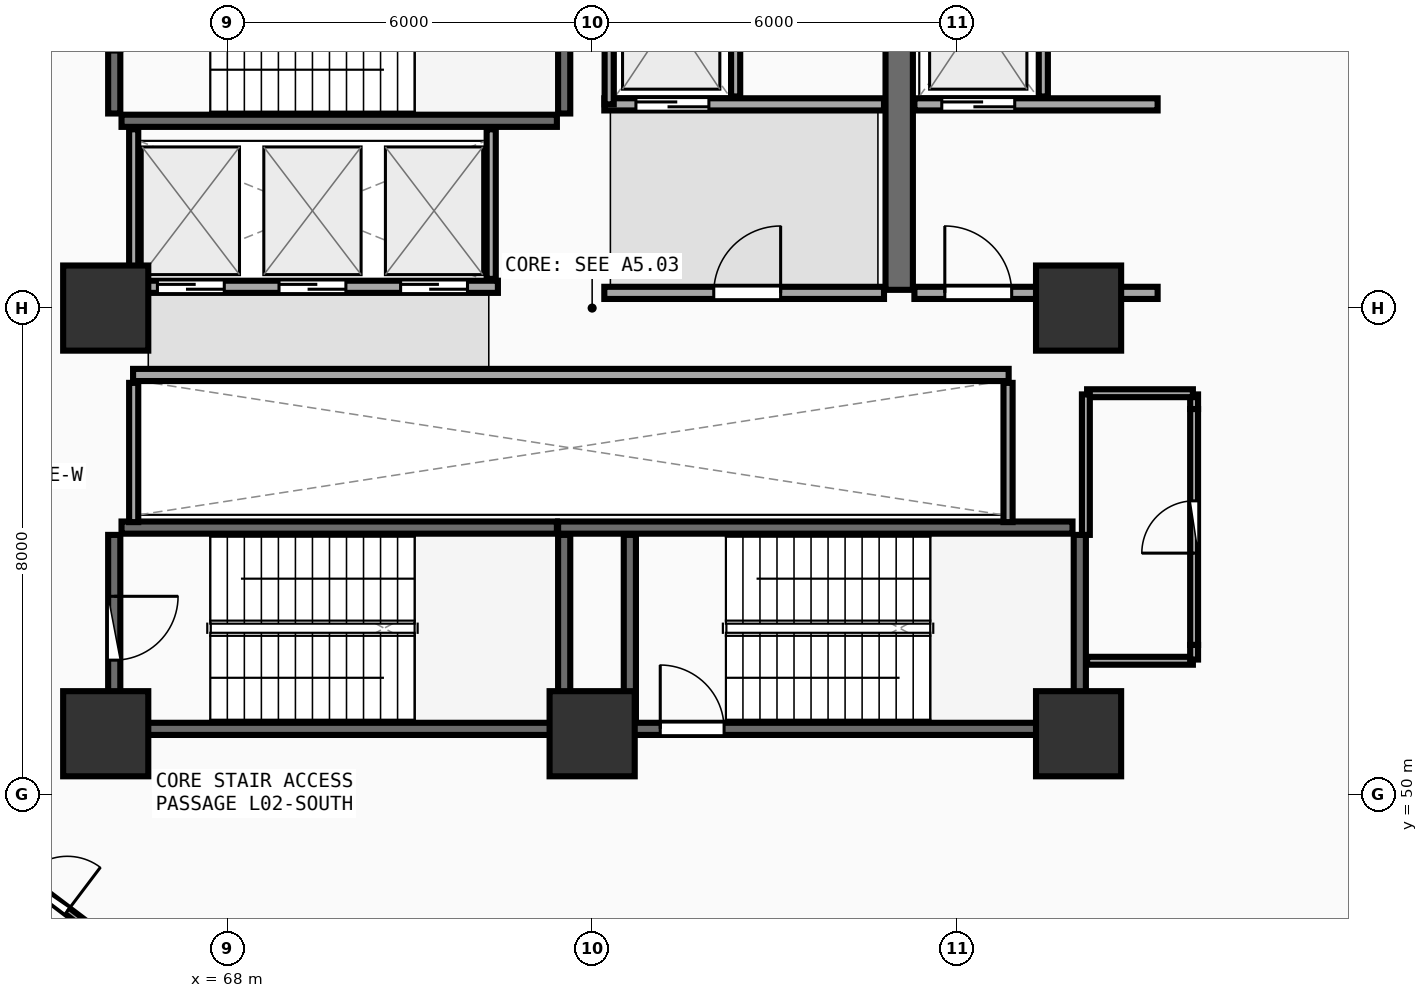
"""IFC4 building model, lengths in metres.
Left out: names, types, materials, properties, quantities, classifications, styles, units other than length and angle.
Written with IfcOpenShell. Run it as: python <this file> out.ifc"""

import sys

from ifc_helpers import new_model, si_unit, direction, frame, frame_2d, origin, origin_2d, place, context, subcontext, project, spatial, rectangle, extrude, element, fill, save


model = new_model("IFC4")
c1 = context("Model", 3, precision=1e-05, world=origin(), true_north=direction((0.0, 1.0)))
c2 = subcontext(c1, "Body", "Model", "MODEL_VIEW")
j1 = project(units=[si_unit("LENGTHUNIT", "METRE"), si_unit("PLANEANGLEUNIT", "RADIAN")], contexts=[c1])
p1 = place(None, origin())
s1 = spatial("IfcSite", under=j1, at=p1, CompositionType="ELEMENT")
p2 = place(p1, origin())
s2 = spatial("IfcBuilding", under=s1, at=p2, CompositionType="ELEMENT")
p3 = place(p2, frame((0.0, 0.0, 9.0)))
s3 = spatial("IfcBuildingStorey", under=s2, at=p3, CompositionType="ELEMENT", Elevation=9.0)
for number, where, z_axis, x_axis in (
    (1, (66.0, 51.0, 0.0), (0.0, 0.0, 1.0), (1.0, 0.0, 0.0)),
    (2, (74.0, 51.0, 0.0), (0.0, 0.0, 1.0), (1.0, 0.0, 0.0)),
    (3, (82.0, 51.0, 0.0), (0.0, 0.0, 1.0), (1.0, 0.0, 0.0)),
    (4, (82.0, 58.0, 0.0), (0.0, 0.0, 1.0), (1.0, 0.0, 0.0)),
    (5, (66.0, 58.0, 0.0), (0.0, 0.0, 1.0), (1.0, 0.0, 0.0)),
):
    element("IfcColumn", number, at=place(p3, frame(where, z_axis=z_axis, x_axis=x_axis)), inside=s3, PredefinedType="PILASTER", context=c2, shape_type="SweptSolid", body=[
        extrude(rectangle(XDim=1.4, YDim=1.4, at=origin_2d()), origin(), (0.0, 0.0, 1.0), 4.5),
    ])
p4 = place(p3, frame((66.26, 61.08, 0.0), z_axis=(0.0, 0.0, 1.0), x_axis=(1.0, 0.0, 0.0)))
e6 = element("IfcWall", 6, at=p4, inside=s3, PredefinedType="SHEAR", context=c2, shape_type="SweptSolid", body=[
    extrude(rectangle(XDim=7.16, YDim=0.2, at=frame_2d((3.58, 0.0))), origin(), (0.0, 0.0, 1.0), 4.1),
])
p5 = place(p3, frame((73.54, 61.2, 0.0), z_axis=(0.0, 0.0, 1.0), x_axis=(0.0, 1.0, 0.0)))
e7 = element("IfcWall", 7, at=p5, inside=s3, PredefinedType="SHEAR", context=c2, shape_type="SweptSolid", body=[
    extrude(rectangle(XDim=3.07, YDim=0.2, at=frame_2d((1.535, 0.0))), origin(), (0.0, 0.0, 1.0), 4.1),
])
p6 = place(p3, frame((66.14, 64.27, 0.0), z_axis=(0.0, 0.0, 1.0), x_axis=(0.0, -1.0, 0.0)))
e8 = element("IfcWall", 8, at=p6, inside=s3, PredefinedType="SHEAR", context=c2, shape_type="SweptSolid", body=[
    extrude(rectangle(XDim=3.07, YDim=0.2, at=frame_2d((1.535, 0.0))), origin(), (0.0, 0.0, 1.0), 4.1),
])
p7 = place(p6, frame((1.01, 0.0, 0.0)))
e9 = element("IfcOpeningElement", 9, at=p7, cuts=e8, PredefinedType="OPENING", context=c2, shape_type="SweptSolid", body=[
    extrude(rectangle(XDim=1.05, YDim=2.1, at=frame_2d((0.525, 1.05))), frame((0.0, 0.11, 0.0), z_axis=(0.0, -1.0, 0.0), x_axis=(1.0, 0.0, 0.0)), (0.0, 0.0, 1.0), 0.22),
])
p8 = place(p3, frame((74.0, 51.08, 0.0), z_axis=(0.0, 0.0, 1.0), x_axis=(1.0, 0.0, 0.0)))
e10 = element("IfcWall", 10, at=p8, inside=s3, PredefinedType="SHEAR", context=c2, shape_type="SweptSolid", body=[
    extrude(rectangle(XDim=7.9, YDim=0.2, at=frame_2d((3.95, 0.0))), origin(), (0.0, 0.0, 1.0), 4.1),
])
p9 = place(p8, frame((1.12, 0.0, 0.0)))
e11 = element("IfcOpeningElement", 11, at=p9, cuts=e10, PredefinedType="OPENING", context=c2, shape_type="SweptSolid", body=[
    extrude(rectangle(XDim=1.05, YDim=2.1, at=frame_2d((0.525, 1.05))), frame((0.0, 0.11, 0.0), z_axis=(0.0, -1.0, 0.0), x_axis=(1.0, 0.0, 0.0)), (0.0, 0.0, 1.0), 0.22),
])
p10 = place(p3, frame((82.02, 51.2, 0.0), z_axis=(0.0, 0.0, 1.0), x_axis=(0.0, 1.0, 0.0)))
e12 = element("IfcWall", 12, at=p10, inside=s3, PredefinedType="SHEAR", context=c2, shape_type="SweptSolid", body=[
    extrude(rectangle(XDim=3.07, YDim=0.2, at=frame_2d((1.535, 0.0))), origin(), (0.0, 0.0, 1.0), 4.1),
])
p11 = place(p3, frame((81.9, 54.39, 0.0), z_axis=(0.0, 0.0, 1.0), x_axis=(-1.0, 0.0, 0.0)))
e13 = element("IfcWall", 13, at=p11, inside=s3, PredefinedType="SHEAR", context=c2, shape_type="SweptSolid", body=[
    extrude(rectangle(XDim=8.46, YDim=0.2, at=frame_2d((4.23, 0.0))), origin(), (0.0, 0.0, 1.0), 4.1),
])
p12 = place(p3, frame((74.62, 54.27, 0.0), z_axis=(0.0, 0.0, 1.0), x_axis=(0.0, -1.0, 0.0)))
e14 = element("IfcWall", 14, at=p12, inside=s3, PredefinedType="SHEAR", context=c2, shape_type="SweptSolid", body=[
    extrude(rectangle(XDim=3.07, YDim=0.2, at=frame_2d((1.535, 0.0))), origin(), (0.0, 0.0, 1.0), 4.1),
])
p13 = place(p3, frame((66.26, 51.08, 0.0), z_axis=(0.0, 0.0, 1.0), x_axis=(1.0, 0.0, 0.0)))
e15 = element("IfcWall", 15, at=p13, inside=s3, PredefinedType="SHEAR", context=c2, shape_type="SweptSolid", body=[
    extrude(rectangle(XDim=7.16, YDim=0.2, at=frame_2d((3.58, 0.0))), origin(), (0.0, 0.0, 1.0), 4.1),
])
p14 = place(p3, frame((73.54, 51.2, 0.0), z_axis=(0.0, 0.0, 1.0), x_axis=(0.0, 1.0, 0.0)))
e16 = element("IfcWall", 16, at=p14, inside=s3, PredefinedType="SHEAR", context=c2, shape_type="SweptSolid", body=[
    extrude(rectangle(XDim=3.07, YDim=0.2, at=frame_2d((1.535, 0.0))), origin(), (0.0, 0.0, 1.0), 4.1),
])
p15 = place(p3, frame((73.42, 54.39, 0.0), z_axis=(0.0, 0.0, 1.0), x_axis=(-1.0, 0.0, 0.0)))
e17 = element("IfcWall", 17, at=p15, inside=s3, PredefinedType="SHEAR", context=c2, shape_type="SweptSolid", body=[
    extrude(rectangle(XDim=7.16, YDim=0.2, at=frame_2d((3.58, 0.0))), origin(), (0.0, 0.0, 1.0), 4.1),
])
p16 = place(p3, frame((66.14, 54.27, 0.0), z_axis=(0.0, 0.0, 1.0), x_axis=(0.0, -1.0, 0.0)))
e18 = element("IfcWall", 18, at=p16, inside=s3, PredefinedType="SHEAR", context=c2, shape_type="SweptSolid", body=[
    extrude(rectangle(XDim=3.07, YDim=0.2, at=frame_2d((1.535, 0.0))), origin(), (0.0, 0.0, 1.0), 4.1),
])
p17 = place(p16, frame((1.01, 0.0, 0.0)))
e19 = element("IfcOpeningElement", 19, at=p17, cuts=e18, PredefinedType="OPENING", context=c2, shape_type="SweptSolid", body=[
    extrude(rectangle(XDim=1.05, YDim=2.1, at=frame_2d((0.525, 1.05))), frame((0.0, 0.11, 0.0), z_axis=(0.0, -1.0, 0.0), x_axis=(1.0, 0.0, 0.0)), (0.0, 0.0, 1.0), 0.22),
])
p18 = place(p3, frame((79.05, 58.3, 0.0), z_axis=(0.0, 0.0, 1.0), x_axis=(0.0, 1.0, 0.0)))
e20 = element("IfcWall", 20, at=p18, inside=s3, PredefinedType="SHEAR", context=c2, shape_type="SweptSolid", body=[
    extrude(rectangle(XDim=6.3, YDim=0.45, at=frame_2d((3.15, 0.0))), origin(), (0.0, 0.0, 1.0), 4.1),
])
p19 = place(p3, frame((74.2, 61.35, 0.0), z_axis=(0.0, 0.0, 1.0), x_axis=(1.0, 0.0, 0.0)))
e21 = element("IfcWall", 21, at=p19, inside=s3, PredefinedType="SOLIDWALL", context=c2, shape_type="SweptSolid", body=[
    extrude(rectangle(XDim=4.6, YDim=0.2, at=frame_2d((2.3, 0.0))), origin(), (0.0, 0.0, 1.0), 4.09),
])
p20 = place(p19, frame((0.52, 0.0, 0.0)))
e22 = element("IfcOpeningElement", 22, at=p20, cuts=e21, PredefinedType="OPENING", context=c2, shape_type="SweptSolid", body=[
    extrude(rectangle(XDim=1.2, YDim=2.15, at=frame_2d((0.6, 1.075))), frame((0.0, 0.11, 0.0), z_axis=(0.0, -1.0, 0.0), x_axis=(1.0, 0.0, 0.0)), (0.0, 0.0, 1.0), 0.22),
])
p21 = place(p3, frame((74.28, 61.35, 0.0), z_axis=(0.0, 0.0, 1.0), x_axis=(0.0, 1.0, 0.0)))
e23 = element("IfcWall", 23, at=p21, inside=s3, PredefinedType="PARTITIONING", context=c2, shape_type="SweptSolid", body=[
    extrude(rectangle(XDim=2.97, YDim=0.15, at=frame_2d((1.485, 0.0))), origin(), (0.0, 0.0, 1.0), 4.09),
])
p22 = place(p3, frame((76.36, 61.48, 0.0), z_axis=(0.0, 0.0, 1.0), x_axis=(0.0, 1.0, 0.0)))
e24 = element("IfcWall", 24, at=p22, inside=s3, PredefinedType="PARTITIONING", context=c2, shape_type="SweptSolid", body=[
    extrude(rectangle(XDim=2.84, YDim=0.15, at=frame_2d((1.42, 0.0))), origin(), (0.0, 0.0, 1.0), 4.09),
])
p23 = place(p3, frame((79.3, 61.35, 0.0), z_axis=(0.0, 0.0, 1.0), x_axis=(1.0, 0.0, 0.0)))
e25 = element("IfcWall", 25, at=p23, inside=s3, PredefinedType="SOLIDWALL", context=c2, shape_type="SweptSolid", body=[
    extrude(rectangle(XDim=4.0, YDim=0.2, at=frame_2d((2.0, 0.0))), origin(), (0.0, 0.0, 1.0), 3.385),
])
p24 = place(p23, frame((0.45, 0.0, 0.0)))
e26 = element("IfcOpeningElement", 26, at=p24, cuts=e25, PredefinedType="OPENING", context=c2, shape_type="SweptSolid", body=[
    extrude(rectangle(XDim=1.2, YDim=2.15, at=frame_2d((0.6, 1.075))), frame((0.0, 0.11, 0.0), z_axis=(0.0, -1.0, 0.0), x_axis=(1.0, 0.0, 0.0)), (0.0, 0.0, 1.0), 0.22),
])
p25 = place(p3, frame((81.42, 61.48, 0.0), z_axis=(0.0, 0.0, 1.0), x_axis=(0.0, 1.0, 0.0)))
e27 = element("IfcWall", 27, at=p25, inside=s3, PredefinedType="PARTITIONING", context=c2, shape_type="SweptSolid", body=[
    extrude(rectangle(XDim=2.84, YDim=0.15, at=frame_2d((1.42, 0.0))), origin(), (0.0, 0.0, 1.0), 4.09),
])
p26 = place(p3, frame((74.2, 58.25, 0.0), z_axis=(0.0, 0.0, 1.0), x_axis=(1.0, 0.0, 0.0)))
e28 = element("IfcWall", 28, at=p26, inside=s3, PredefinedType="SOLIDWALL", context=c2, shape_type="SweptSolid", body=[
    extrude(rectangle(XDim=4.6, YDim=0.2, at=frame_2d((2.3, 0.0))), origin(), (0.0, 0.0, 1.0), 4.09),
])
p27 = place(p26, frame((1.8, 0.0, 0.0)))
e29 = element("IfcOpeningElement", 29, at=p27, cuts=e28, PredefinedType="OPENING", context=c2, shape_type="SweptSolid", body=[
    extrude(rectangle(XDim=1.1, YDim=2.1, at=frame_2d((0.55, 1.05))), frame((0.0, 0.11, 0.0), z_axis=(0.0, -1.0, 0.0), x_axis=(1.0, 0.0, 0.0)), (0.0, 0.0, 1.0), 0.22),
])
p28 = place(p3, frame((79.3, 58.25, 0.0), z_axis=(0.0, 0.0, 1.0), x_axis=(1.0, 0.0, 0.0)))
e30 = element("IfcWall", 30, at=p28, inside=s3, PredefinedType="SOLIDWALL", context=c2, shape_type="SweptSolid", body=[
    extrude(rectangle(XDim=4.0, YDim=0.2, at=frame_2d((2.0, 0.0))), origin(), (0.0, 0.0, 1.0), 3.385),
])
p29 = place(p28, frame((0.5, 0.0, 0.0)))
e31 = element("IfcOpeningElement", 31, at=p29, cuts=e30, PredefinedType="OPENING", context=c2, shape_type="SweptSolid", body=[
    extrude(rectangle(XDim=1.1, YDim=2.1, at=frame_2d((0.55, 1.05))), frame((0.0, 0.11, 0.0), z_axis=(0.0, -1.0, 0.0), x_axis=(1.0, 0.0, 0.0)), (0.0, 0.0, 1.0), 0.22),
])
p30 = place(p3, frame((66.45, 58.35, 0.0), z_axis=(0.0, 0.0, 1.0), x_axis=(1.0, 0.0, 0.0)))
e32 = element("IfcWall", 32, at=p30, inside=s3, PredefinedType="SOLIDWALL", context=c2, shape_type="SweptSolid", body=[
    extrude(rectangle(XDim=6.0, YDim=0.2, at=frame_2d((3.0, 0.0))), origin(), (0.0, 0.0, 1.0), 4.09),
])
p31 = place(p30, frame((0.4, 0.0, 0.0)))
e33 = element("IfcOpeningElement", 33, at=p31, cuts=e32, PredefinedType="OPENING", context=c2, shape_type="SweptSolid", body=[
    extrude(rectangle(XDim=1.1, YDim=2.1, at=frame_2d((0.55, 1.05))), frame((0.0, 0.11, 0.0), z_axis=(0.0, -1.0, 0.0), x_axis=(1.0, 0.0, 0.0)), (0.0, 0.0, 1.0), 0.22),
])
p32 = place(p30, frame((2.4, 0.0, 0.0)))
e34 = element("IfcOpeningElement", 34, at=p32, cuts=e32, PredefinedType="OPENING", context=c2, shape_type="SweptSolid", body=[
    extrude(rectangle(XDim=1.1, YDim=2.1, at=frame_2d((0.55, 1.05))), frame((0.0, 0.11, 0.0), z_axis=(0.0, -1.0, 0.0), x_axis=(1.0, 0.0, 0.0)), (0.0, 0.0, 1.0), 0.22),
])
p33 = place(p30, frame((4.4, 0.0, 0.0)))
e35 = element("IfcOpeningElement", 35, at=p33, cuts=e32, PredefinedType="OPENING", context=c2, shape_type="SweptSolid", body=[
    extrude(rectangle(XDim=1.1, YDim=2.1, at=frame_2d((0.55, 1.05))), frame((0.0, 0.11, 0.0), z_axis=(0.0, -1.0, 0.0), x_axis=(1.0, 0.0, 0.0)), (0.0, 0.0, 1.0), 0.22),
])
for number, where, z_axis, x_axis in (
    (36, (66.46, 58.48, 0.0), (0.0, 0.0, 1.0), (0.0, 1.0, 0.0)),
    (37, (72.34, 58.48, 0.0), (0.0, 0.0, 1.0), (0.0, 1.0, 0.0)),
):
    element("IfcWall", number, at=place(p3, frame(where, z_axis=z_axis, x_axis=x_axis)), inside=s3, PredefinedType="PARTITIONING", context=c2, shape_type="SweptSolid", body=[
        extrude(rectangle(XDim=2.46, YDim=0.15, at=frame_2d((1.23, 0.0))), origin(), (0.0, 0.0, 1.0), 4.09),
    ])
p34 = place(p3, frame((66.45, 56.9, 0.0), z_axis=(0.0, 0.0, 1.0), x_axis=(1.0, 0.0, 0.0)))
e38 = element("IfcWall", 38, at=p34, inside=s3, PredefinedType="SOLIDWALL", context=c2, shape_type="SweptSolid", body=[
    extrude(rectangle(XDim=14.4, YDim=0.2, at=frame_2d((7.2, 0.0))), origin(), (0.0, 0.0, 1.0), 4.09),
])
for number, where, z_axis, x_axis in (
    (39, (66.46, 54.48, 0.0), (0.0, 0.0, 1.0), (0.0, 1.0, 0.0)),
    (40, (80.84, 54.48, 0.0), (0.0, 0.0, 1.0), (0.0, 1.0, 0.0)),
):
    element("IfcWall", number, at=place(p3, frame(where, z_axis=z_axis, x_axis=x_axis)), inside=s3, PredefinedType="PARTITIONING", context=c2, shape_type="SweptSolid", body=[
        extrude(rectangle(XDim=2.29, YDim=0.15, at=frame_2d((1.145, 0.0))), origin(), (0.0, 0.0, 1.0), 4.09),
    ])
p35 = place(p3, frame((83.9, 52.46, 0.0), z_axis=(0.0, 0.0, 1.0), x_axis=(0.0, 1.0, 0.0)))
e41 = element("IfcWall", 41, at=p35, inside=s3, PredefinedType="PLUMBINGWALL", context=c2, shape_type="SweptSolid", body=[
    extrude(rectangle(XDim=3.88, YDim=0.13, at=frame_2d((1.94, 0.0))), origin(), (0.0, 0.0, 1.0), 4.09),
])
p36 = place(p35, frame((1.51, 0.0, 0.0)))
e42 = element("IfcOpeningElement", 42, at=p36, cuts=e41, PredefinedType="OPENING", context=c2, shape_type="SweptSolid", body=[
    extrude(rectangle(XDim=0.86, YDim=2.05, at=frame_2d((0.43, 1.025))), frame((0.0, 0.075, 0.0), z_axis=(0.0, -1.0, 0.0), x_axis=(1.0, 0.0, 0.0)), (0.0, 0.0, 1.0), 0.15),
])
p37 = place(p3, frame((64.309, 48.886, 0.0), z_axis=(0.0, 0.0, 1.0), x_axis=(0.797861385226, -0.602840949144, 0.0)))
e43 = element("IfcWall", 43, at=p37, inside=s3, PredefinedType="PARTITIONING", context=c2, shape_type="SweptSolid", body=[
    extrude(rectangle(XDim=1.758, YDim=0.12, at=frame_2d((0.879, 0.0))), origin(), (0.0, 0.0, 1.0), 3.485),
])
p38 = place(p37, frame((0.429, 0.0, 0.0)))
e44 = element("IfcOpeningElement", 44, at=p38, cuts=e43, PredefinedType="OPENING", context=c2, shape_type="SweptSolid", body=[
    extrude(rectangle(XDim=0.9, YDim=2.08, at=frame_2d((0.45, 1.04))), frame((0.0, 0.07, 0.0), z_axis=(0.0, -1.0, 0.0), x_axis=(1.0, 0.0, 0.0)), (0.0, 0.0, 1.0), 0.14),
])
p39 = place(p3, frame((82.14, 52.2, 0.0), z_axis=(0.0, 0.0, 1.0), x_axis=(1.0, 0.0, 0.0)))
e45 = element("IfcWall", 45, at=p39, inside=s3, PredefinedType="PLUMBINGWALL", context=c2, shape_type="SweptSolid", body=[
    extrude(rectangle(XDim=1.74, YDim=0.13, at=frame_2d((0.87, 0.0))), origin(), (0.0, 0.0, 1.0), 3.385),
])
for number, where, z_axis, x_axis in (
    (46, (83.9, 52.22, 0.0), (0.0, 0.0, 1.0), (0.0, 1.0, 0.0)),
    (47, (83.9, 56.34, 0.0), (0.0, 0.0, 1.0), (0.0, 1.0, 0.0)),
):
    element("IfcWall", number, at=place(p3, frame(where, z_axis=z_axis, x_axis=x_axis)), inside=s3, PredefinedType="PLUMBINGWALL", context=c2, shape_type="SweptSolid", body=[
        extrude(rectangle(XDim=0.24, YDim=0.13, at=frame_2d((0.12, 0.0))), origin(), (0.0, 0.0, 1.0), 4.09),
    ])
p40 = place(p3, frame((83.88, 56.6, 0.0), z_axis=(0.0, 0.0, 1.0), x_axis=(-1.0, 0.0, 0.0)))
e48 = element("IfcWall", 48, at=p40, inside=s3, PredefinedType="PLUMBINGWALL", context=c2, shape_type="SweptSolid", body=[
    extrude(rectangle(XDim=1.74, YDim=0.13, at=frame_2d((0.87, 0.0))), origin(), (0.0, 0.0, 1.0), 3.385),
])
p41 = place(p3, frame((82.12, 56.58, 0.0), z_axis=(0.0, 0.0, 1.0), x_axis=(0.0, -1.0, 0.0)))
e49 = element("IfcWall", 49, at=p41, inside=s3, PredefinedType="PLUMBINGWALL", context=c2, shape_type="SweptSolid", body=[
    extrude(rectangle(XDim=2.31, YDim=0.13, at=frame_2d((1.155, 0.0))), origin(), (0.0, 0.0, 1.0), 3.385),
])
p42 = place(p3, frame((87.698, 60.661, 0.0), z_axis=(0.0, 0.0, 1.0), x_axis=(-0.396638629538, 0.917974834927, 0.0)))
e50 = element("IfcWall", 50, at=p42, inside=s3, PredefinedType="PARTITIONING", context=c2, shape_type="SweptSolid", body=[
    extrude(rectangle(XDim=4.039, YDim=0.1, at=frame_2d((2.02, 0.0))), origin(), (0.0, 0.0, 1.0), 4.09),
])
p43 = place(p9, origin())
e51 = element("IfcDoor", 51, at=p43, inside=s3, OperationType="SINGLE_SWING_LEFT", PredefinedType="DOOR", context=c2, shape_type="SweptSolid", body=[
    extrude(rectangle(XDim=1.05, YDim=2.1, at=frame_2d((0.525, 1.05))), frame((0.0, 0.025, 0.0), z_axis=(0.0, -1.0, 0.0), x_axis=(1.0, 0.0, 0.0)), (0.0, 0.0, 1.0), 0.05),
])
fill(e11, e51)
p44 = place(p17, origin())
e52 = element("IfcDoor", 52, at=p44, inside=s3, OperationType="SINGLE_SWING_LEFT", PredefinedType="DOOR", context=c2, shape_type="SweptSolid", body=[
    extrude(rectangle(XDim=1.05, YDim=2.1, at=frame_2d((0.525, 1.05))), frame((0.0, 0.025, 0.0), z_axis=(0.0, -1.0, 0.0), x_axis=(1.0, 0.0, 0.0)), (0.0, 0.0, 1.0), 0.05),
])
fill(e19, e52)
p45 = place(p20, origin())
e53 = element("IfcDoor", 53, at=p45, inside=s3, OperationType="DOUBLE_DOOR_SLIDING", PredefinedType="DOOR", context=c2, shape_type="SweptSolid", body=[
    extrude(rectangle(XDim=1.2, YDim=2.15, at=frame_2d((0.6, 1.075))), frame((0.0, 0.025, 0.0), z_axis=(0.0, -1.0, 0.0), x_axis=(1.0, 0.0, 0.0)), (0.0, 0.0, 1.0), 0.05),
])
fill(e22, e53)
p46 = place(p24, origin())
e54 = element("IfcDoor", 54, at=p46, inside=s3, OperationType="DOUBLE_DOOR_SLIDING", PredefinedType="DOOR", context=c2, shape_type="SweptSolid", body=[
    extrude(rectangle(XDim=1.2, YDim=2.15, at=frame_2d((0.6, 1.075))), frame((0.0, 0.025, 0.0), z_axis=(0.0, -1.0, 0.0), x_axis=(1.0, 0.0, 0.0)), (0.0, 0.0, 1.0), 0.05),
])
fill(e26, e54)
p47 = place(p27, frame((1.1, 0.0, 0.0), z_axis=(0.0, 0.0, 1.0), x_axis=(-1.0, 0.0, 0.0)))
e55 = element("IfcDoor", 55, at=p47, inside=s3, OperationType="SINGLE_SWING_LEFT", PredefinedType="DOOR", context=c2, shape_type="SweptSolid", body=[
    extrude(rectangle(XDim=1.1, YDim=2.1, at=frame_2d((0.55, 1.05))), frame((0.0, 0.025, 0.0), z_axis=(0.0, -1.0, 0.0), x_axis=(1.0, 0.0, 0.0)), (0.0, 0.0, 1.0), 0.05),
])
fill(e29, e55)
p48 = place(p29, frame((1.1, 0.0, 0.0), z_axis=(0.0, 0.0, 1.0), x_axis=(-1.0, 0.0, 0.0)))
e56 = element("IfcDoor", 56, at=p48, inside=s3, OperationType="SINGLE_SWING_RIGHT", PredefinedType="DOOR", context=c2, shape_type="SweptSolid", body=[
    extrude(rectangle(XDim=1.1, YDim=2.1, at=frame_2d((0.55, 1.05))), frame((0.0, 0.025, 0.0), z_axis=(0.0, -1.0, 0.0), x_axis=(1.0, 0.0, 0.0)), (0.0, 0.0, 1.0), 0.05),
])
fill(e31, e56)
p49 = place(p31, origin())
e57 = element("IfcDoor", 57, at=p49, inside=s3, OperationType="DOUBLE_DOOR_SLIDING", PredefinedType="DOOR", context=c2, shape_type="SweptSolid", body=[
    extrude(rectangle(XDim=1.1, YDim=2.1, at=frame_2d((0.55, 1.05))), frame((0.0, 0.025, 0.0), z_axis=(0.0, -1.0, 0.0), x_axis=(1.0, 0.0, 0.0)), (0.0, 0.0, 1.0), 0.05),
])
fill(e33, e57)
p50 = place(p32, origin())
e58 = element("IfcDoor", 58, at=p50, inside=s3, OperationType="DOUBLE_DOOR_SLIDING", PredefinedType="DOOR", context=c2, shape_type="SweptSolid", body=[
    extrude(rectangle(XDim=1.1, YDim=2.1, at=frame_2d((0.55, 1.05))), frame((0.0, 0.025, 0.0), z_axis=(0.0, -1.0, 0.0), x_axis=(1.0, 0.0, 0.0)), (0.0, 0.0, 1.0), 0.05),
])
fill(e34, e58)
p51 = place(p33, origin())
e59 = element("IfcDoor", 59, at=p51, inside=s3, OperationType="DOUBLE_DOOR_SLIDING", PredefinedType="DOOR", context=c2, shape_type="SweptSolid", body=[
    extrude(rectangle(XDim=1.1, YDim=2.1, at=frame_2d((0.55, 1.05))), frame((0.0, 0.025, 0.0), z_axis=(0.0, -1.0, 0.0), x_axis=(1.0, 0.0, 0.0)), (0.0, 0.0, 1.0), 0.05),
])
fill(e35, e59)
p52 = place(p36, origin())
e60 = element("IfcDoor", 60, at=p52, inside=s3, OperationType="SINGLE_SWING_LEFT", PredefinedType="DOOR", context=c2, shape_type="SweptSolid", body=[
    extrude(rectangle(XDim=0.86, YDim=2.05, at=frame_2d((0.43, 1.025))), frame((0.0, 0.025, 0.0), z_axis=(0.0, -1.0, 0.0), x_axis=(1.0, 0.0, 0.0)), (0.0, 0.0, 1.0), 0.05),
])
fill(e42, e60)
p53 = place(p38, origin())
e61 = element("IfcDoor", 61, at=p53, inside=s3, OperationType="SINGLE_SWING_RIGHT", PredefinedType="DOOR", context=c2, shape_type="SweptSolid", body=[
    extrude(rectangle(XDim=0.9, YDim=2.08, at=frame_2d((0.45, 1.04))), frame((0.0, 0.025, 0.0), z_axis=(0.0, -1.0, 0.0), x_axis=(1.0, 0.0, 0.0)), (0.0, 0.0, 1.0), 0.05),
])
fill(e44, e61)
save(model, sys.argv[1])
